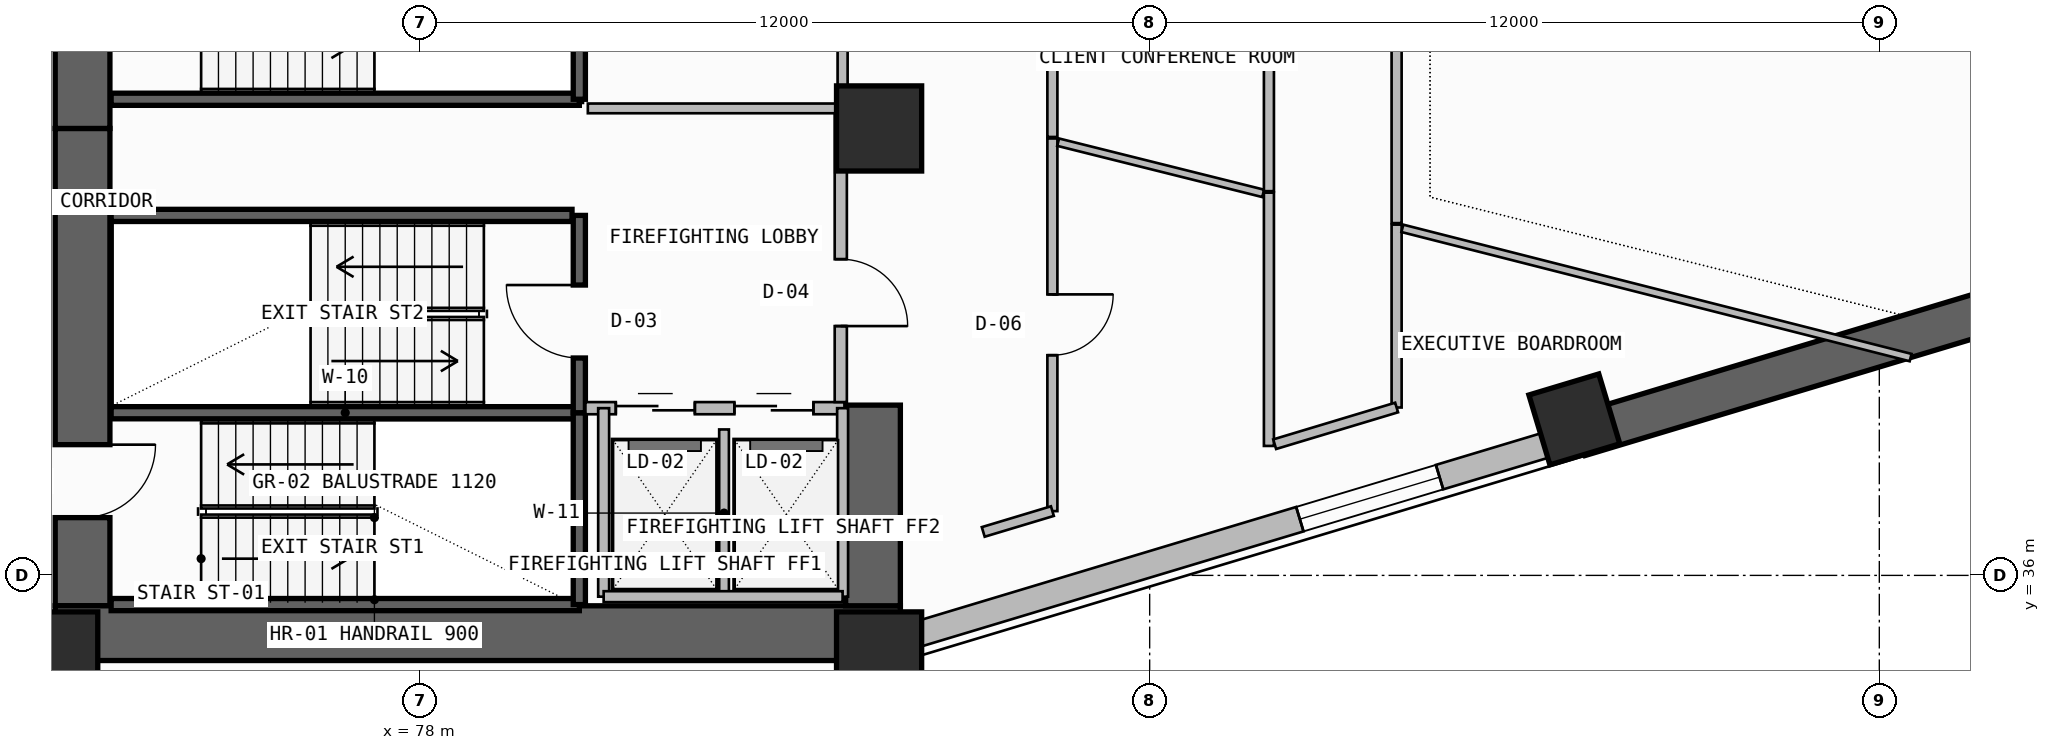
"""IFC4 building model, lengths in metres.
Left out: names, types, materials, properties, quantities, classifications, styles, units other than length and angle.
Written with IfcOpenShell. Run it as: python <this file> out.ifc"""

import sys

from ifc_helpers import new_model, si_unit, direction, frame, frame_2d, origin, origin_2d, place, context, subcontext, project, spatial, rectangle, extrude, element, fill, save


model = new_model("IFC4")
c1 = context("Model", 3, precision=1e-05, world=origin(), true_north=direction((0.0, 1.0)))
c2 = subcontext(c1, "Body", "Model", "MODEL_VIEW")
j1 = project(units=[si_unit("LENGTHUNIT", "METRE"), si_unit("PLANEANGLEUNIT", "RADIAN")], contexts=[c1])
p1 = place(None, origin())
s1 = spatial("IfcSite", under=j1, at=p1, CompositionType="ELEMENT")
p2 = place(p1, origin())
s2 = spatial("IfcBuilding", under=s1, at=p2, CompositionType="ELEMENT")
p3 = place(p2, frame((0.0, 0.0, 135.9)))
s3 = spatial("IfcBuildingStorey", under=s2, at=p3, CompositionType="ELEMENT", Elevation=135.9)
p4 = place(p3, frame((72.45, 35.5, -0.26), z_axis=(0.0, 0.0, 1.0), x_axis=(0.0, 1.0, 0.0)))
e1 = element("IfcWall", 1, at=p4, inside=s3, PredefinedType="SHEAR", context=c2, shape_type="SweptSolid", body=[
    extrude(rectangle(XDim=7.85, YDim=0.9, at=frame_2d((3.925, 0.0))), origin(), (0.0, 0.0, 1.0), 3.6),
])
p5 = place(p4, frame((1.45, 0.0, 0.26)))
e2 = element("IfcOpeningElement", 2, at=p5, cuts=e1, PredefinedType="OPENING", context=c2, shape_type="SweptSolid", body=[
    extrude(rectangle(XDim=1.2, YDim=2.2, at=frame_2d((0.6, 1.1))), frame((0.0, 0.46, 0.0), z_axis=(0.0, -1.0, 0.0), x_axis=(1.0, 0.0, 0.0)), (0.0, 0.0, 1.0), 0.92),
])
p6 = place(p3, frame((72.0, 35.05, -0.26), z_axis=(0.0, 0.0, 1.0), x_axis=(1.0, 0.0, 0.0)))
e3 = element("IfcWall", 3, at=p6, inside=s3, PredefinedType="SHEAR", context=c2, shape_type="SweptSolid", body=[
    extrude(rectangle(XDim=13.9, YDim=0.9, at=frame_2d((6.95, 0.0))), origin(), (0.0, 0.0, 1.0), 3.6),
])
p7 = place(p3, frame((85.45, 35.5, -0.26), z_axis=(0.0, 0.0, 1.0), x_axis=(0.0, 1.0, 0.0)))
e4 = element("IfcWall", 4, at=p7, inside=s3, PredefinedType="SHEAR", context=c2, shape_type="SweptSolid", body=[
    extrude(rectangle(XDim=3.3, YDim=0.9, at=frame_2d((1.65, 0.0))), origin(), (0.0, 0.0, 1.0), 3.6),
])
p8 = place(p3, frame((72.45, 43.35, -0.26), z_axis=(0.0, 0.0, 1.0), x_axis=(0.0, 1.0, 0.0)))
e5 = element("IfcWall", 5, at=p8, inside=s3, PredefinedType="SHEAR", context=c2, shape_type="SweptSolid", body=[
    extrude(rectangle(XDim=12.7, YDim=0.9, at=frame_2d((6.35, 0.0))), origin(), (0.0, 0.0, 1.0), 3.6),
])
p9 = place(p8, frame((1.35, 0.0, 0.26)))
e6 = element("IfcOpeningElement", 6, at=p9, cuts=e5, PredefinedType="OPENING", context=c2, shape_type="SweptSolid", body=[
    extrude(rectangle(XDim=1.2, YDim=2.2, at=frame_2d((0.6, 1.1))), frame((0.0, 0.46, 0.0), z_axis=(0.0, -1.0, 0.0), x_axis=(1.0, 0.0, 0.0)), (0.0, 0.0, 1.0), 0.92),
])
for number, where, z_axis, x_axis in (
    (7, (72.0, 34.7, 0.0), (0.0, 0.0, 1.0), (1.0, 0.0, 0.0)),
    (8, (85.55, 34.7, 0.0), (0.0, 0.0, 1.0), (1.0, 0.0, 0.0)),
    (9, (85.55, 43.35, 0.0), (0.0, 0.0, 1.0), (1.0, 0.0, 0.0)),
):
    element("IfcColumn", number, at=place(p3, frame(where, z_axis=z_axis, x_axis=x_axis)), inside=s3, PredefinedType="COLUMN", context=c2, shape_type="SweptSolid", body=[
        extrude(rectangle(XDim=1.4, YDim=1.4, at=origin_2d()), origin(), (0.0, 0.0, 1.0), 3.6),
    ])
p10 = place(p3, frame((96.985, 38.565, 0.0), z_axis=(0.0, 0.0, 1.0), x_axis=(0.957571360805, 0.288196268134, 0.0)))
e10 = element("IfcColumn", 10, at=p10, inside=s3, PredefinedType="COLUMN", context=c2, shape_type="SweptSolid", body=[
    extrude(rectangle(XDim=1.2, YDim=1.2, at=origin_2d()), origin(), (0.0, 0.0, 1.0), 3.6),
])
p11 = place(p3, frame((86.1, 35.007, 0.0), z_axis=(0.0, 0.0, 1.0), x_axis=(0.957569401796, 0.288202777129, 0.0)))
e11 = element("IfcWall", 11, at=p11, inside=s3, PredefinedType="SOLIDWALL", context=c2, shape_type="SweptSolid", body=[
    extrude(rectangle(XDim=11.448, YDim=0.42, at=frame_2d((5.724, 0.0))), origin(), (0.0, 0.0, 1.0), 2.325),
])
p12 = place(p11, frame((6.652, 0.0, 1.2)))
e12 = element("IfcOpeningElement", 12, at=p12, cuts=e11, PredefinedType="OPENING", context=c2, shape_type="SweptSolid", body=[
    extrude(rectangle(XDim=2.4, YDim=0.9, at=frame_2d((1.2, 0.45))), frame((0.0, 0.22, 0.0), z_axis=(0.0, -1.0, 0.0), x_axis=(1.0, 0.0, 0.0)), (0.0, 0.0, 1.0), 0.44),
])
p13 = place(p3, frame((97.062, 38.307, -0.26), z_axis=(0.0, 0.0, 1.0), x_axis=(0.957569832102, 0.288201347408, 0.0)))
e13 = element("IfcWall", 13, at=p13, inside=s3, PredefinedType="SHEAR", context=c2, shape_type="SweptSolid", body=[
    extrude(rectangle(XDim=13.199, YDim=0.7, at=frame_2d((6.6, 0.0))), origin(), (0.0, 0.0, 1.0), 3.6),
])
for number, where, z_axis, x_axis in (
    (14, (72.92, 35.52, -0.26), (0.0, 0.0, 1.0), (1.0, 0.0, 0.0)),
    (15, (72.92, 38.675, -0.26), (0.0, 0.0, 1.0), (1.0, 0.0, 0.0)),
):
    element("IfcWall", number, at=place(p3, frame(where, z_axis=z_axis, x_axis=x_axis)), inside=s3, PredefinedType="SOLIDWALL", context=c2, shape_type="SweptSolid", body=[
        extrude(rectangle(XDim=7.7, YDim=0.2, at=frame_2d((3.85, 0.0))), origin(), (0.0, 0.0, 1.0), 3.6),
    ])
p14 = place(p3, frame((80.62, 35.52, -0.26), z_axis=(0.0, 0.0, 1.0), x_axis=(0.0, 1.0, 0.0)))
e16 = element("IfcWall", 16, at=p14, inside=s3, PredefinedType="SOLIDWALL", context=c2, shape_type="SweptSolid", body=[
    extrude(rectangle(XDim=3.155, YDim=0.2, at=frame_2d((1.578, 0.0))), origin(), (0.0, 0.0, 1.0), 3.6),
])
p15 = place(p3, frame((80.62, 38.675, -0.26), z_axis=(0.0, 0.0, 1.0), x_axis=(0.0, 1.0, 0.0)))
e17 = element("IfcWall", 17, at=p15, inside=s3, PredefinedType="SOLIDWALL", context=c2, shape_type="SweptSolid", body=[
    extrude(rectangle(XDim=3.245, YDim=0.2, at=frame_2d((1.623, 0.0))), origin(), (0.0, 0.0, 1.0), 3.6),
])
p16 = place(p15, frame((0.9, 0.0, 0.26)))
e18 = element("IfcOpeningElement", 18, at=p16, cuts=e17, PredefinedType="OPENING", context=c2, shape_type="SweptSolid", body=[
    extrude(rectangle(XDim=1.2, YDim=2.2, at=frame_2d((0.6, 1.1))), frame((0.0, 0.11, 0.0), z_axis=(0.0, -1.0, 0.0), x_axis=(1.0, 0.0, 0.0)), (0.0, 0.0, 1.0), 0.22),
])
p17 = place(p3, frame((80.72, 38.75, 0.0), z_axis=(0.0, 0.0, 1.0), x_axis=(1.0, 0.0, 0.0)))
e19 = element("IfcWall", 19, at=p17, inside=s3, PredefinedType="SOLIDWALL", context=c2, shape_type="SweptSolid", body=[
    extrude(rectangle(XDim=4.26, YDim=0.2, at=frame_2d((2.13, 0.0))), origin(), (0.0, 0.0, 1.0), 3.34),
])
p18 = place(p17, frame((0.5, 0.0, 0.0)))
e20 = element("IfcOpeningElement", 20, at=p18, cuts=e19, PredefinedType="OPENING", context=c2, shape_type="SweptSolid", body=[
    extrude(rectangle(XDim=1.3, YDim=2.3, at=frame_2d((0.65, 1.15))), frame((0.0, 0.11, 0.0), z_axis=(0.0, -1.0, 0.0), x_axis=(1.0, 0.0, 0.0)), (0.0, 0.0, 1.0), 0.22),
])
p19 = place(p17, frame((2.45, 0.0, 0.0)))
e21 = element("IfcOpeningElement", 21, at=p19, cuts=e19, PredefinedType="OPENING", context=c2, shape_type="SweptSolid", body=[
    extrude(rectangle(XDim=1.3, YDim=2.3, at=frame_2d((0.65, 1.15))), frame((0.0, 0.11, 0.0), z_axis=(0.0, -1.0, 0.0), x_axis=(1.0, 0.0, 0.0)), (0.0, 0.0, 1.0), 0.22),
])
p20 = place(p3, frame((83.0, 35.65, 0.0), z_axis=(0.0, 0.0, 1.0), x_axis=(0.0, 1.0, 0.0)))
e22 = element("IfcWall", 22, at=p20, inside=s3, PredefinedType="PLUMBINGWALL", context=c2, shape_type="SweptSolid", body=[
    extrude(rectangle(XDim=2.75, YDim=0.16, at=frame_2d((1.375, 0.0))), origin(), (0.0, 0.0, 1.0), 3.34),
])
for number, where, z_axis, x_axis in (
    (23, (84.95, 35.65, 0.0), (0.0, 0.0, 1.0), (0.0, 1.0, 0.0)),
    (24, (81.02, 35.65, 0.0), (0.0, 0.0, 1.0), (0.0, 1.0, 0.0)),
):
    element("IfcWall", number, at=place(p3, frame(where, z_axis=z_axis, x_axis=x_axis)), inside=s3, PredefinedType="SOLIDWALL", context=c2, shape_type="SweptSolid", body=[
        extrude(rectangle(XDim=3.1, YDim=0.18, at=frame_2d((1.55, 0.0))), origin(), (0.0, 0.0, 1.0), 3.34),
    ])
p21 = place(p3, frame((81.02, 35.65, 0.0), z_axis=(0.0, 0.0, 1.0), x_axis=(1.0, 0.0, 0.0)))
e25 = element("IfcWall", 25, at=p21, inside=s3, PredefinedType="SOLIDWALL", context=c2, shape_type="SweptSolid", body=[
    extrude(rectangle(XDim=3.93, YDim=0.18, at=frame_2d((1.965, 0.0))), origin(), (0.0, 0.0, 1.0), 3.34),
])
p22 = place(p3, frame((84.92, 38.85, 0.0), z_axis=(0.0, 0.0, 1.0), x_axis=(0.0, 1.0, 0.0)))
e26 = element("IfcWall", 26, at=p22, inside=s3, PredefinedType="SOLIDWALL", context=c2, shape_type="SweptSolid", body=[
    extrude(rectangle(XDim=4.83, YDim=0.2, at=frame_2d((2.415, 0.0))), origin(), (0.0, 0.0, 1.0), 3.34),
])
p23 = place(p22, frame((1.25, 0.0, 0.0)))
e27 = element("IfcOpeningElement", 27, at=p23, cuts=e26, PredefinedType="OPENING", context=c2, shape_type="SweptSolid", body=[
    extrude(rectangle(XDim=1.1, YDim=2.2, at=frame_2d((0.55, 1.1))), frame((0.0, 0.11, 0.0), z_axis=(0.0, -1.0, 0.0), x_axis=(1.0, 0.0, 0.0)), (0.0, 0.0, 1.0), 0.22),
])
p24 = place(p3, frame((72.92, 41.92, -0.26), z_axis=(0.0, 0.0, 1.0), x_axis=(1.0, 0.0, 0.0)))
e28 = element("IfcWall", 28, at=p24, inside=s3, PredefinedType="SOLIDWALL", context=c2, shape_type="SweptSolid", body=[
    extrude(rectangle(XDim=7.58, YDim=0.2, at=frame_2d((3.79, 0.0))), origin(), (0.0, 0.0, 1.0), 3.6),
])
p25 = place(p3, frame((72.92, 43.83, -0.26), z_axis=(0.0, 0.0, 1.0), x_axis=(1.0, 0.0, 0.0)))
e29 = element("IfcWall", 29, at=p25, inside=s3, PredefinedType="SOLIDWALL", context=c2, shape_type="SweptSolid", body=[
    extrude(rectangle(XDim=7.7, YDim=0.2, at=frame_2d((3.85, 0.0))), origin(), (0.0, 0.0, 1.0), 3.6),
])
p26 = place(p3, frame((80.62, 43.83, -0.26), z_axis=(0.0, 0.0, 1.0), x_axis=(0.0, 1.0, 0.0)))
e30 = element("IfcWall", 30, at=p26, inside=s3, PredefinedType="SOLIDWALL", context=c2, shape_type="SweptSolid", body=[
    extrude(rectangle(XDim=3.24, YDim=0.2, at=frame_2d((1.62, 0.0))), origin(), (0.0, 0.0, 1.0), 3.6),
])
p27 = place(p3, frame((84.95, 43.68, 0.0), z_axis=(0.0, 0.0, 1.0), x_axis=(0.0, 1.0, 0.0)))
e31 = element("IfcWall", 31, at=p27, inside=s3, PredefinedType="PLUMBINGWALL", context=c2, shape_type="SweptSolid", body=[
    extrude(rectangle(XDim=1.9, YDim=0.165, at=frame_2d((0.95, 0.0))), origin(), (0.0, 0.0, 1.0), 3.34),
])
p28 = place(p3, frame((80.76, 43.68, 0.0), z_axis=(0.0, 0.0, 1.0), x_axis=(1.0, 0.0, 0.0)))
e32 = element("IfcWall", 32, at=p28, inside=s3, PredefinedType="PLUMBINGWALL", context=c2, shape_type="SweptSolid", body=[
    extrude(rectangle(XDim=4.19, YDim=0.16, at=frame_2d((2.095, 0.0))), origin(), (0.0, 0.0, 1.0), 3.34),
])
p29 = place(p3, frame((88.4, 37.057, 0.0), z_axis=(0.0, 0.0, 1.0), x_axis=(0.0, 1.0, 0.0)))
e33 = element("IfcWall", 33, at=p29, inside=s3, PredefinedType="PARTITIONING", context=c2, shape_type="SweptSolid", body=[
    extrude(rectangle(XDim=6.128, YDim=0.165, at=frame_2d((3.064, 0.0))), origin(), (0.0, 0.0, 1.0), 2.725),
])
p30 = place(p29, frame((2.564, 0.0, 0.0)))
e34 = element("IfcOpeningElement", 34, at=p30, cuts=e33, PredefinedType="OPENING", context=c2, shape_type="SweptSolid", body=[
    extrude(rectangle(XDim=1.0, YDim=2.2, at=frame_2d((0.5, 1.1))), frame((0.0, 0.093, 0.0), z_axis=(0.0, -1.0, 0.0), x_axis=(1.0, 0.0, 0.0)), (0.0, 0.0, 1.0), 0.185),
])
p31 = place(p3, frame((91.961, 42.294, 0.0), z_axis=(0.0, 0.0, 1.0), x_axis=(0.0, -1.0, 0.0)))
e35 = element("IfcWall", 35, at=p31, inside=s3, PredefinedType="PARTITIONING", context=c2, shape_type="SweptSolid", body=[
    extrude(rectangle(XDim=4.165, YDim=0.165, at=frame_2d((2.083, 0.0))), origin(), (0.0, 0.0, 1.0), 3.34),
])
p32 = place(p3, frame((94.061, 38.761, 0.0), z_axis=(0.0, 0.0, 1.0), x_axis=(0.0, 1.0, 0.0)))
e36 = element("IfcWall", 36, at=p32, inside=s3, PredefinedType="PARTITIONING", context=c2, shape_type="SweptSolid", body=[
    extrude(rectangle(XDim=3.007, YDim=0.165, at=frame_2d((1.504, 0.0))), origin(), (0.0, 0.0, 1.0), 3.34),
])
p33 = place(p3, frame((92.056, 38.157, 0.0), z_axis=(0.0, 0.0, 1.0), x_axis=(0.957575652527, 0.288182007919, 0.0)))
e37 = element("IfcWall", 37, at=p33, inside=s3, PredefinedType="PARTITIONING", context=c2, shape_type="SweptSolid", body=[
    extrude(rectangle(XDim=2.094, YDim=0.165, at=frame_2d((1.047, 0.0))), origin(), (0.0, 0.0, 1.0), 3.34),
])
p34 = place(p3, frame((87.263, 36.715, 0.0), z_axis=(0.0, 0.0, 1.0), x_axis=(0.957548542079, 0.288272075584, 0.0)))
e38 = element("IfcWall", 38, at=p34, inside=s3, PredefinedType="PARTITIONING", context=c2, shape_type="SweptSolid", body=[
    extrude(rectangle(XDim=1.187, YDim=0.165, at=frame_2d((0.594, 0.0))), origin(), (0.0, 0.0, 1.0), 3.34),
])
p35 = place(p3, frame((94.156, 41.707, 0.0), z_axis=(0.0, 0.0, 1.0), x_axis=(0.969165666748, -0.246410045243, 0.0)))
e39 = element("IfcWall", 39, at=p35, inside=s3, PredefinedType="PARTITIONING", context=c2, shape_type="SweptSolid", body=[
    extrude(rectangle(XDim=8.625, YDim=0.125, at=frame_2d((4.312, 0.0))), origin(), (0.0, 0.0, 1.0), 2.325),
])
p36 = place(p3, frame((88.494, 43.125, 0.0), z_axis=(0.0, 0.0, 1.0), x_axis=(0.970212698563, -0.242254658463, 0.0)))
e40 = element("IfcWall", 40, at=p36, inside=s3, PredefinedType="PARTITIONING", context=c2, shape_type="SweptSolid", body=[
    extrude(rectangle(XDim=3.476, YDim=0.125, at=frame_2d((1.738, 0.0))), origin(), (0.0, 0.0, 1.0), 2.725),
])
p37 = place(p3, frame((94.061, 41.793, 0.0), z_axis=(0.0, 0.0, 1.0), x_axis=(0.0, 1.0, 0.0)))
e41 = element("IfcWall", 41, at=p37, inside=s3, PredefinedType="PARTITIONING", context=c2, shape_type="SweptSolid", body=[
    extrude(rectangle(XDim=15.439, YDim=0.165, at=frame_2d((7.719, 0.0))), origin(), (0.0, 0.0, 1.0), 2.725),
])
p38 = place(p37, frame((7.219, 0.0, 0.0)))
e42 = element("IfcOpeningElement", 42, at=p38, cuts=e41, PredefinedType="OPENING", context=c2, shape_type="SweptSolid", body=[
    extrude(rectangle(XDim=1.0, YDim=2.2, at=frame_2d((0.5, 1.1))), frame((0.0, 0.093, 0.0), z_axis=(0.0, -1.0, 0.0), x_axis=(1.0, 0.0, 0.0)), (0.0, 0.0, 1.0), 0.185),
])
p39 = place(p3, frame((91.961, 55.629, 0.0), z_axis=(0.0, 0.0, 1.0), x_axis=(0.0, -1.0, 0.0)))
e43 = element("IfcWall", 43, at=p39, inside=s3, PredefinedType="PARTITIONING", context=c2, shape_type="SweptSolid", body=[
    extrude(rectangle(XDim=13.311, YDim=0.165, at=frame_2d((6.655, 0.0))), origin(), (0.0, 0.0, 1.0), 2.725),
])
p40 = place(p39, frame((6.155, 0.0, 0.0)))
e44 = element("IfcOpeningElement", 44, at=p40, cuts=e43, PredefinedType="OPENING", context=c2, shape_type="SweptSolid", body=[
    extrude(rectangle(XDim=1.0, YDim=2.2, at=frame_2d((0.5, 1.1))), frame((0.0, 0.093, 0.0), z_axis=(0.0, -1.0, 0.0), x_axis=(1.0, 0.0, 0.0)), (0.0, 0.0, 1.0), 0.185),
])
p41 = place(p3, frame((88.4, 43.21, 0.0), z_axis=(0.0, 0.0, 1.0), x_axis=(0.0, 1.0, 0.0)))
e45 = element("IfcWall", 45, at=p41, inside=s3, PredefinedType="PARTITIONING", context=c2, shape_type="SweptSolid", body=[
    extrude(rectangle(XDim=9.701, YDim=0.165, at=frame_2d((4.851, 0.0))), origin(), (0.0, 0.0, 1.0), 2.725),
])
p42 = place(p12, origin())
e46 = element("IfcWindow", 46, at=p42, inside=s3, PartitioningType="SINGLE_PANEL", PredefinedType="WINDOW", context=c2, shape_type="SweptSolid", body=[
    extrude(rectangle(XDim=2.4, YDim=0.9, at=frame_2d((1.2, 0.45))), frame((0.0, 0.03, 0.0), z_axis=(0.0, -1.0, 0.0), x_axis=(1.0, 0.0, 0.0)), (0.0, 0.0, 1.0), 0.06),
])
fill(e12, e46)
p43 = place(p5, frame((1.2, 0.0, 0.0), z_axis=(0.0, 0.0, 1.0), x_axis=(-1.0, 0.0, 0.0)))
e47 = element("IfcDoor", 47, at=p43, inside=s3, OperationType="SINGLE_SWING_LEFT", PredefinedType="USERDEFINED", context=c2, shape_type="SweptSolid", body=[
    extrude(rectangle(XDim=1.2, YDim=2.2, at=frame_2d((0.6, 1.1))), frame((0.0, 0.025, 0.0), z_axis=(0.0, -1.0, 0.0), x_axis=(1.0, 0.0, 0.0)), (0.0, 0.0, 1.0), 0.05),
])
fill(e2, e47)
p44 = place(p16, origin())
e48 = element("IfcDoor", 48, at=p44, inside=s3, OperationType="SINGLE_SWING_RIGHT", PredefinedType="USERDEFINED", context=c2, shape_type="SweptSolid", body=[
    extrude(rectangle(XDim=1.2, YDim=2.2, at=frame_2d((0.6, 1.1))), frame((0.0, 0.025, 0.0), z_axis=(0.0, -1.0, 0.0), x_axis=(1.0, 0.0, 0.0)), (0.0, 0.0, 1.0), 0.05),
])
fill(e18, e48)
p45 = place(p18, origin())
e49 = element("IfcDoor", 49, at=p45, inside=s3, OperationType="DOUBLE_DOOR_SLIDING", PredefinedType="DOOR", context=c2, shape_type="SweptSolid", body=[
    extrude(rectangle(XDim=1.3, YDim=2.3, at=frame_2d((0.65, 1.15))), frame((0.0, 0.025, 0.0), z_axis=(0.0, -1.0, 0.0), x_axis=(1.0, 0.0, 0.0)), (0.0, 0.0, 1.0), 0.05),
])
fill(e20, e49)
p46 = place(p19, origin())
e50 = element("IfcDoor", 50, at=p46, inside=s3, OperationType="DOUBLE_DOOR_SLIDING", PredefinedType="DOOR", context=c2, shape_type="SweptSolid", body=[
    extrude(rectangle(XDim=1.3, YDim=2.3, at=frame_2d((0.65, 1.15))), frame((0.0, 0.025, 0.0), z_axis=(0.0, -1.0, 0.0), x_axis=(1.0, 0.0, 0.0)), (0.0, 0.0, 1.0), 0.05),
])
fill(e21, e50)
p47 = place(p23, frame((1.1, 0.0, 0.0), z_axis=(0.0, 0.0, 1.0), x_axis=(-1.0, 0.0, 0.0)))
e51 = element("IfcDoor", 51, at=p47, inside=s3, OperationType="SINGLE_SWING_RIGHT", PredefinedType="DOOR", context=c2, shape_type="SweptSolid", body=[
    extrude(rectangle(XDim=1.1, YDim=2.2, at=frame_2d((0.55, 1.1))), frame((0.0, 0.025, 0.0), z_axis=(0.0, -1.0, 0.0), x_axis=(1.0, 0.0, 0.0)), (0.0, 0.0, 1.0), 0.05),
])
fill(e27, e51)
p48 = place(p30, frame((1.0, 0.0, 0.0), z_axis=(0.0, 0.0, 1.0), x_axis=(-1.0, 0.0, 0.0)))
e52 = element("IfcDoor", 52, at=p48, inside=s3, OperationType="SINGLE_SWING_LEFT", PredefinedType="DOOR", context=c2, shape_type="SweptSolid", body=[
    extrude(rectangle(XDim=1.0, YDim=2.2, at=frame_2d((0.5, 1.1))), frame((0.0, 0.025, 0.0), z_axis=(0.0, -1.0, 0.0), x_axis=(1.0, 0.0, 0.0)), (0.0, 0.0, 1.0), 0.05),
])
fill(e34, e52)
save(model, sys.argv[1])
